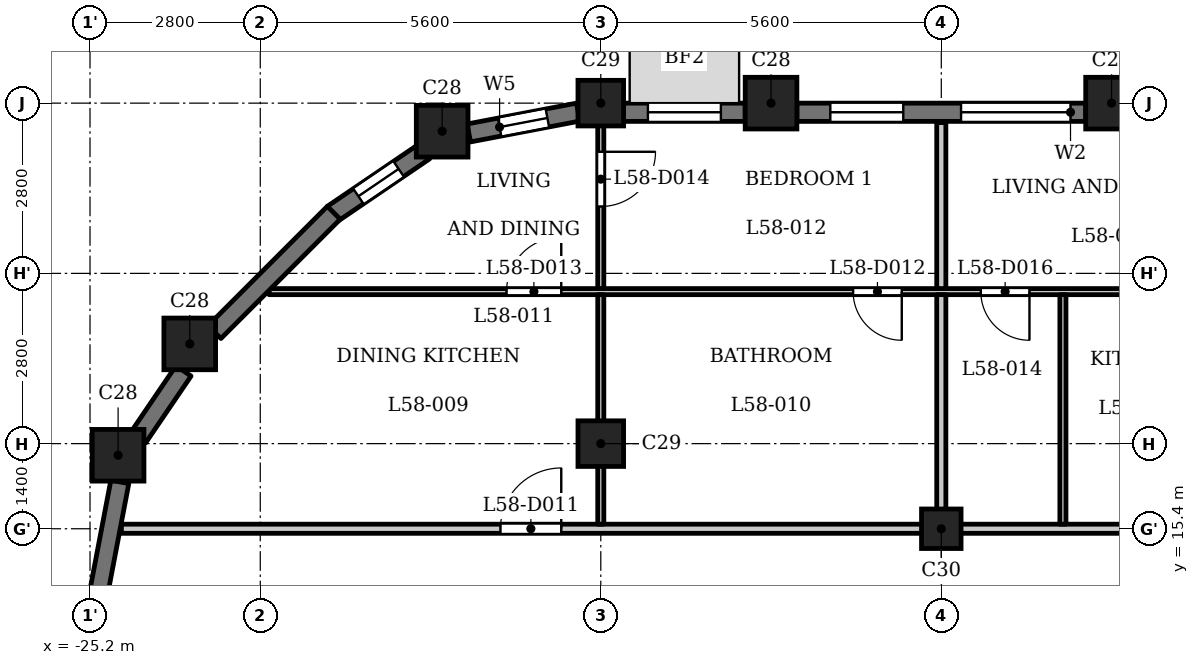
"""IFC4 building model, lengths in metres.
Left out: names, types, materials, properties, quantities, classifications, styles, units other than length and angle.
Written with IfcOpenShell. Run it as: python <this file> out.ifc"""

import sys

from ifc_helpers import new_model, si_unit, direction, frame, frame_2d, origin, origin_2d, place, context, subcontext, project, spatial, rectangle, extrude, element, fill, save


model = new_model("IFC4")
c1 = context("Model", 3, precision=1e-05, world=origin(), true_north=direction((0.0, 1.0)))
c2 = subcontext(c1, "Body", "Model", "MODEL_VIEW")
j1 = project(units=[si_unit("LENGTHUNIT", "METRE"), si_unit("PLANEANGLEUNIT", "RADIAN")], contexts=[c1])
p1 = place(None, origin())
s1 = spatial("IfcSite", under=j1, at=p1, CompositionType="ELEMENT")
p2 = place(p1, origin())
s2 = spatial("IfcBuilding", under=s1, at=p2, CompositionType="ELEMENT")
p3 = place(p2, frame((0.0, 0.0, 223.9)))
s3 = spatial("IfcBuildingStorey", under=s2, at=p3, CompositionType="ELEMENT", Elevation=223.9)
for number, where, z_axis, x_axis in (
    (1, (-8.4, 22.4, 0.0), (0.0, 0.0, 1.0), (1.0, 0.0, 0.0)),
    (2, (-14.0, 22.4, 0.0), (0.0, 0.0, 1.0), (1.0, 0.0, 0.0)),
    (3, (-19.409, 21.938, 0.0), (0.0, 0.0, 1.0), (1.0, 0.0, 0.0)),
    (4, (-23.56, 18.44, 0.0), (0.0, 0.0, 1.0), (1.0, 0.0, 0.0)),
    (5, (-24.738, 16.609, 0.0), (0.0, 0.0, 1.0), (1.0, 0.0, 0.0)),
):
    element("IfcColumn", number, at=place(p3, frame(where, z_axis=z_axis, x_axis=x_axis)), inside=s3, PredefinedType="COLUMN", context=c2, shape_type="SweptSolid", body=[
        extrude(rectangle(XDim=0.85, YDim=0.85, at=origin_2d()), origin(), (0.0, 0.0, 1.0), 3.5),
    ])
for number, where, z_axis, x_axis in (
    (6, (-16.8, 16.8, 0.0), (0.0, 0.0, 1.0), (1.0, 0.0, 0.0)),
    (7, (-16.8, 22.4, 0.0), (0.0, 0.0, 1.0), (1.0, 0.0, 0.0)),
):
    element("IfcColumn", number, at=place(p3, frame(where, z_axis=z_axis, x_axis=x_axis)), inside=s3, PredefinedType="COLUMN", context=c2, shape_type="SweptSolid", body=[
        extrude(rectangle(XDim=0.75, YDim=0.75, at=origin_2d()), origin(), (0.0, 0.0, 1.0), 3.5),
    ])
p4 = place(p3, frame((-11.2, 15.4, 0.0), z_axis=(0.0, 0.0, 1.0), x_axis=(1.0, 0.0, 0.0)))
e8 = element("IfcColumn", 8, at=p4, inside=s3, PredefinedType="COLUMN", context=c2, shape_type="SweptSolid", body=[
    extrude(rectangle(XDim=0.65, YDim=0.65, at=origin_2d()), origin(), (0.0, 0.0, 1.0), 3.5),
])
p5 = place(p3, frame((-8.825, 22.25, 0.0), z_axis=(0.0, 0.0, 1.0), x_axis=(-1.0, 0.0, 0.0)))
e9 = element("IfcWall", 9, at=p5, inside=s3, PredefinedType="SOLIDWALL", context=c2, shape_type="SweptSolid", body=[
    extrude(rectangle(XDim=4.75, YDim=0.3, at=frame_2d((2.375, 0.0))), origin(), (0.0, 0.0, 1.0), 2.5),
])
p6 = place(p5, frame((0.25, 0.0, 0.9)))
e10 = element("IfcOpeningElement", 10, at=p6, cuts=e9, PredefinedType="OPENING", context=c2, shape_type="SweptSolid", body=[
    extrude(rectangle(XDim=1.8, YDim=1.25, at=frame_2d((0.9, 0.625))), frame((0.0, 0.16, 0.0), z_axis=(0.0, -1.0, 0.0), x_axis=(1.0, 0.0, 0.0)), (0.0, 0.0, 1.0), 0.32),
])
p7 = place(p5, frame((3.0, 0.0, 0.6)))
e11 = element("IfcOpeningElement", 11, at=p7, cuts=e9, PredefinedType="OPENING", context=c2, shape_type="SweptSolid", body=[
    extrude(rectangle(XDim=1.2, YDim=1.55, at=frame_2d((0.6, 0.775))), frame((0.0, 0.16, 0.0), z_axis=(0.0, -1.0, 0.0), x_axis=(1.0, 0.0, 0.0)), (0.0, 0.0, 1.0), 0.32),
])
p8 = place(p3, frame((-14.425, 22.25, 0.0), z_axis=(0.0, 0.0, 1.0), x_axis=(-1.0, 0.0, 0.0)))
e12 = element("IfcWall", 12, at=p8, inside=s3, PredefinedType="SOLIDWALL", context=c2, shape_type="SweptSolid", body=[
    extrude(rectangle(XDim=2.0, YDim=0.3, at=frame_2d((1.0, 0.0))), origin(), (0.0, 0.0, 1.0), 2.5),
])
p9 = place(p8, frame((0.4, 0.0, 0.6)))
e13 = element("IfcOpeningElement", 13, at=p9, cuts=e12, PredefinedType="OPENING", context=c2, shape_type="SweptSolid", body=[
    extrude(rectangle(XDim=1.2, YDim=1.55, at=frame_2d((0.6, 0.775))), frame((0.0, 0.16, 0.0), z_axis=(0.0, -1.0, 0.0), x_axis=(1.0, 0.0, 0.0)), (0.0, 0.0, 1.0), 0.32),
])
p10 = place(p3, frame((-17.172, 22.253, 0.0), z_axis=(0.0, 0.0, 1.0), x_axis=(-0.982300037503, -0.187314271538, 0.0)))
e14 = element("IfcWall", 14, at=p10, inside=s3, PredefinedType="SOLIDWALL", context=c2, shape_type="SweptSolid", body=[
    extrude(rectangle(XDim=1.831, YDim=0.3, at=frame_2d((0.916, 0.0))), origin(), (0.0, 0.0, 1.0), 2.5),
])
p11 = place(p10, frame((0.516, 0.0, 0.6)))
e15 = element("IfcOpeningElement", 15, at=p11, cuts=e14, PredefinedType="OPENING", context=c2, shape_type="SweptSolid", body=[
    extrude(rectangle(XDim=0.8, YDim=1.55, at=frame_2d((0.4, 0.775))), frame((0.0, 0.16, 0.0), z_axis=(0.0, -1.0, 0.0), x_axis=(1.0, 0.0, 0.0)), (0.0, 0.0, 1.0), 0.32),
])
p12 = place(p3, frame((-19.698, 21.608, 0.0), z_axis=(0.0, 0.0, 1.0), x_axis=(-0.82705295608, -0.562124014644, 0.0)))
e16 = element("IfcWall", 16, at=p12, inside=s3, PredefinedType="SOLIDWALL", context=c2, shape_type="SweptSolid", body=[
    extrude(rectangle(XDim=1.831, YDim=0.3, at=frame_2d((0.916, 0.0))), origin(), (0.0, 0.0, 1.0), 2.5),
])
p13 = place(p12, frame((0.516, 0.0, 0.6)))
e17 = element("IfcOpeningElement", 17, at=p13, cuts=e16, PredefinedType="OPENING", context=c2, shape_type="SweptSolid", body=[
    extrude(rectangle(XDim=0.8, YDim=1.55, at=frame_2d((0.4, 0.775))), frame((0.0, 0.16, 0.0), z_axis=(0.0, -1.0, 0.0), x_axis=(1.0, 0.0, 0.0)), (0.0, 0.0, 1.0), 0.32),
])
p14 = place(p3, frame((-21.191, 20.597, 0.0), z_axis=(0.0, 0.0, 1.0), x_axis=(-0.707150767798, -0.707062791838, 0.0)))
e18 = element("IfcWall", 18, at=p14, inside=s3, PredefinedType="SOLIDWALL", context=c2, shape_type="SweptSolid", body=[
    extrude(rectangle(XDim=2.775, YDim=0.3, at=frame_2d((1.388, 0.0))), origin(), (0.0, 0.0, 1.0), 2.5),
])
p15 = place(p3, frame((-23.662, 17.996, 0.0), z_axis=(0.0, 0.0, 1.0), x_axis=(-0.562149004813, -0.827035970432, 0.0)))
e19 = element("IfcWall", 19, at=p15, inside=s3, PredefinedType="SOLIDWALL", context=c2, shape_type="SweptSolid", body=[
    extrude(rectangle(XDim=1.327, YDim=0.3, at=frame_2d((0.664, 0.0))), origin(), (0.0, 0.0, 1.0), 2.5),
])
p16 = place(p3, frame((-24.709, 16.171, 0.0), z_axis=(0.0, 0.0, 1.0), x_axis=(-0.187442908742, -0.982275499014, 0.0)))
e20 = element("IfcWall", 20, at=p16, inside=s3, PredefinedType="SOLIDWALL", context=c2, shape_type="SweptSolid", body=[
    extrude(rectangle(XDim=1.831, YDim=0.3, at=frame_2d((0.916, 0.0))), origin(), (0.0, 0.0, 1.0), 2.5),
])
p17 = place(p3, frame((-24.684, 15.4, 0.0), z_axis=(0.0, 0.0, 1.0), x_axis=(1.0, 0.0, 0.0)))
e21 = element("IfcWall", 21, at=p17, inside=s3, PredefinedType="PARTITIONING", context=c2, shape_type="SweptSolid", body=[
    extrude(rectangle(XDim=49.368, YDim=0.15, at=frame_2d((24.684, 0.0))), origin(), (0.0, 0.0, 1.0), 3.2),
])
p18 = place(p17, frame((6.234, 0.0, 0.0)))
e22 = element("IfcOpeningElement", 22, at=p18, cuts=e21, PredefinedType="OPENING", context=c2, shape_type="SweptSolid", body=[
    extrude(rectangle(XDim=1.0, YDim=2.1, at=frame_2d((0.5, 1.05))), frame((0.0, 0.085, 0.0), z_axis=(0.0, -1.0, 0.0), x_axis=(1.0, 0.0, 0.0)), (0.0, 0.0, 1.0), 0.17),
])
p19 = place(p17, frame((17.434, 0.0, 0.0)))
e23 = element("IfcOpeningElement", 23, at=p19, cuts=e21, PredefinedType="OPENING", context=c2, shape_type="SweptSolid", body=[
    extrude(rectangle(XDim=1.0, YDim=2.1, at=frame_2d((0.5, 1.05))), frame((0.0, 0.085, 0.0), z_axis=(0.0, -1.0, 0.0), x_axis=(1.0, 0.0, 0.0)), (0.0, 0.0, 1.0), 0.17),
])
p20 = place(p17, frame((25.384, 0.0, 0.0)))
e24 = element("IfcOpeningElement", 24, at=p20, cuts=e21, PredefinedType="OPENING", context=c2, shape_type="SweptSolid", body=[
    extrude(rectangle(XDim=1.0, YDim=2.1, at=frame_2d((0.5, 1.05))), frame((0.0, 0.085, 0.0), z_axis=(0.0, -1.0, 0.0), x_axis=(1.0, 0.0, 0.0)), (0.0, 0.0, 1.0), 0.17),
])
p21 = place(p17, frame((33.484, 0.0, 0.0)))
e25 = element("IfcOpeningElement", 25, at=p21, cuts=e21, PredefinedType="OPENING", context=c2, shape_type="SweptSolid", body=[
    extrude(rectangle(XDim=1.0, YDim=2.1, at=frame_2d((0.5, 1.05))), frame((0.0, 0.085, 0.0), z_axis=(0.0, -1.0, 0.0), x_axis=(1.0, 0.0, 0.0)), (0.0, 0.0, 1.0), 0.17),
])
p22 = place(p17, frame((47.225, 0.0, 0.0)))
e26 = element("IfcOpeningElement", 26, at=p22, cuts=e21, PredefinedType="OPENING", context=c2, shape_type="SweptSolid", body=[
    extrude(rectangle(XDim=1.0, YDim=2.1, at=frame_2d((0.5, 1.05))), frame((0.0, 0.085, 0.0), z_axis=(0.0, -1.0, 0.0), x_axis=(1.0, 0.0, 0.0)), (0.0, 0.0, 1.0), 0.17),
])
p23 = place(p3, frame((-22.256, 19.3, 0.0), z_axis=(0.0, 0.0, 1.0), x_axis=(1.0, 0.0, 0.0)))
e27 = element("IfcWall", 27, at=p23, inside=s3, PredefinedType="PARTITIONING", context=c2, shape_type="SweptSolid", body=[
    extrude(rectangle(XDim=44.511, YDim=0.1, at=frame_2d((22.256, 0.0))), origin(), (0.0, 0.0, 1.0), 3.2),
])
p24 = place(p23, frame((9.606, 0.0, 0.0)))
e28 = element("IfcOpeningElement", 28, at=p24, cuts=e27, PredefinedType="OPENING", context=c2, shape_type="SweptSolid", body=[
    extrude(rectangle(XDim=0.8, YDim=2.1, at=frame_2d((0.4, 1.05))), frame((0.0, 0.06, 0.0), z_axis=(0.0, -1.0, 0.0), x_axis=(1.0, 0.0, 0.0)), (0.0, 0.0, 1.0), 0.12),
])
p25 = place(p23, frame((3.906, 0.0, 0.0)))
e29 = element("IfcOpeningElement", 29, at=p25, cuts=e27, PredefinedType="OPENING", context=c2, shape_type="SweptSolid", body=[
    extrude(rectangle(XDim=0.9, YDim=2.1, at=frame_2d((0.45, 1.05))), frame((0.0, 0.06, 0.0), z_axis=(0.0, -1.0, 0.0), x_axis=(1.0, 0.0, 0.0)), (0.0, 0.0, 1.0), 0.12),
])
p26 = place(p23, frame((11.706, 0.0, 0.0)))
e30 = element("IfcOpeningElement", 30, at=p26, cuts=e27, PredefinedType="OPENING", context=c2, shape_type="SweptSolid", body=[
    extrude(rectangle(XDim=0.8, YDim=2.1, at=frame_2d((0.4, 1.05))), frame((0.0, 0.06, 0.0), z_axis=(0.0, -1.0, 0.0), x_axis=(1.0, 0.0, 0.0)), (0.0, 0.0, 1.0), 0.12),
])
p27 = place(p23, frame((15.106, 0.0, 0.0)))
e31 = element("IfcOpeningElement", 31, at=p27, cuts=e27, PredefinedType="OPENING", context=c2, shape_type="SweptSolid", body=[
    extrude(rectangle(XDim=0.9, YDim=2.1, at=frame_2d((0.45, 1.05))), frame((0.0, 0.06, 0.0), z_axis=(0.0, -1.0, 0.0), x_axis=(1.0, 0.0, 0.0)), (0.0, 0.0, 1.0), 0.12),
])
p28 = place(p23, frame((17.556, 0.0, 0.0)))
e32 = element("IfcOpeningElement", 32, at=p28, cuts=e27, PredefinedType="OPENING", context=c2, shape_type="SweptSolid", body=[
    extrude(rectangle(XDim=0.8, YDim=2.1, at=frame_2d((0.4, 1.05))), frame((0.0, 0.06, 0.0), z_axis=(0.0, -1.0, 0.0), x_axis=(1.0, 0.0, 0.0)), (0.0, 0.0, 1.0), 0.12),
])
p29 = place(p23, frame((19.956, 0.0, 0.0)))
e33 = element("IfcOpeningElement", 33, at=p29, cuts=e27, PredefinedType="OPENING", context=c2, shape_type="SweptSolid", body=[
    extrude(rectangle(XDim=0.9, YDim=2.1, at=frame_2d((0.45, 1.05))), frame((0.0, 0.06, 0.0), z_axis=(0.0, -1.0, 0.0), x_axis=(1.0, 0.0, 0.0)), (0.0, 0.0, 1.0), 0.12),
])
p30 = place(p23, frame((23.456, 0.0, 0.0)))
e34 = element("IfcOpeningElement", 34, at=p30, cuts=e27, PredefinedType="OPENING", context=c2, shape_type="SweptSolid", body=[
    extrude(rectangle(XDim=0.9, YDim=2.1, at=frame_2d((0.45, 1.05))), frame((0.0, 0.06, 0.0), z_axis=(0.0, -1.0, 0.0), x_axis=(1.0, 0.0, 0.0)), (0.0, 0.0, 1.0), 0.12),
])
p31 = place(p23, frame((26.056, 0.0, 0.0)))
e35 = element("IfcOpeningElement", 35, at=p31, cuts=e27, PredefinedType="OPENING", context=c2, shape_type="SweptSolid", body=[
    extrude(rectangle(XDim=0.9, YDim=2.1, at=frame_2d((0.45, 1.05))), frame((0.0, 0.06, 0.0), z_axis=(0.0, -1.0, 0.0), x_axis=(1.0, 0.0, 0.0)), (0.0, 0.0, 1.0), 0.12),
])
p32 = place(p23, frame((28.756, 0.0, 0.0)))
e36 = element("IfcOpeningElement", 36, at=p32, cuts=e27, PredefinedType="OPENING", context=c2, shape_type="SweptSolid", body=[
    extrude(rectangle(XDim=0.8, YDim=2.1, at=frame_2d((0.4, 1.05))), frame((0.0, 0.06, 0.0), z_axis=(0.0, -1.0, 0.0), x_axis=(1.0, 0.0, 0.0)), (0.0, 0.0, 1.0), 0.12),
])
p33 = place(p23, frame((31.156, 0.0, 0.0)))
e37 = element("IfcOpeningElement", 37, at=p33, cuts=e27, PredefinedType="OPENING", context=c2, shape_type="SweptSolid", body=[
    extrude(rectangle(XDim=0.9, YDim=2.1, at=frame_2d((0.45, 1.05))), frame((0.0, 0.06, 0.0), z_axis=(0.0, -1.0, 0.0), x_axis=(1.0, 0.0, 0.0)), (0.0, 0.0, 1.0), 0.12),
])
p34 = place(p23, frame((37.606, 0.0, 0.0)))
e38 = element("IfcOpeningElement", 38, at=p34, cuts=e27, PredefinedType="OPENING", context=c2, shape_type="SweptSolid", body=[
    extrude(rectangle(XDim=0.8, YDim=2.1, at=frame_2d((0.4, 1.05))), frame((0.0, 0.06, 0.0), z_axis=(0.0, -1.0, 0.0), x_axis=(1.0, 0.0, 0.0)), (0.0, 0.0, 1.0), 0.12),
])
p35 = place(p23, frame((42.028, 0.0, 0.0)))
e39 = element("IfcOpeningElement", 39, at=p35, cuts=e27, PredefinedType="OPENING", context=c2, shape_type="SweptSolid", body=[
    extrude(rectangle(XDim=0.9, YDim=2.1, at=frame_2d((0.45, 1.05))), frame((0.0, 0.06, 0.0), z_axis=(0.0, -1.0, 0.0), x_axis=(1.0, 0.0, 0.0)), (0.0, 0.0, 1.0), 0.12),
])
p36 = place(p3, frame((-16.8, 15.475, 0.0), z_axis=(0.0, 0.0, 1.0), x_axis=(0.0, 1.0, 0.0)))
e40 = element("IfcWall", 40, at=p36, inside=s3, PredefinedType="PARTITIONING", context=c2, shape_type="SweptSolid", body=[
    extrude(rectangle(XDim=3.775, YDim=0.1, at=frame_2d((1.887, 0.0))), origin(), (0.0, 0.0, 1.0), 2.55),
])
p37 = place(p3, frame((-16.8, 19.35, 0.0), z_axis=(0.0, 0.0, 1.0), x_axis=(0.0, 1.0, 0.0)))
e41 = element("IfcWall", 41, at=p37, inside=s3, PredefinedType="PARTITIONING", context=c2, shape_type="SweptSolid", body=[
    extrude(rectangle(XDim=2.96, YDim=0.1, at=frame_2d((1.48, 0.0))), origin(), (0.0, 0.0, 1.0), 2.55),
])
p38 = place(p37, frame((1.35, 0.0, 0.0)))
e42 = element("IfcOpeningElement", 42, at=p38, cuts=e41, PredefinedType="OPENING", context=c2, shape_type="SweptSolid", body=[
    extrude(rectangle(XDim=0.9, YDim=2.1, at=frame_2d((0.45, 1.05))), frame((0.0, 0.06, 0.0), z_axis=(0.0, -1.0, 0.0), x_axis=(1.0, 0.0, 0.0)), (0.0, 0.0, 1.0), 0.12),
])
p39 = place(p3, frame((-11.2, 15.475, 0.0), z_axis=(0.0, 0.0, 1.0), x_axis=(0.0, 1.0, 0.0)))
e43 = element("IfcWall", 43, at=p39, inside=s3, PredefinedType="PARTITIONING", context=c2, shape_type="SweptSolid", body=[
    extrude(rectangle(XDim=3.775, YDim=0.15, at=frame_2d((1.887, 0.0))), origin(), (0.0, 0.0, 1.0), 3.2),
])
p40 = place(p3, frame((-11.2, 19.35, 0.0), z_axis=(0.0, 0.0, 1.0), x_axis=(0.0, 1.0, 0.0)))
e44 = element("IfcWall", 44, at=p40, inside=s3, PredefinedType="PARTITIONING", context=c2, shape_type="SweptSolid", body=[
    extrude(rectangle(XDim=2.73, YDim=0.15, at=frame_2d((1.365, 0.0))), origin(), (0.0, 0.0, 1.0), 3.2),
])
p41 = place(p3, frame((-9.2, 15.475, 0.0), z_axis=(0.0, 0.0, 1.0), x_axis=(0.0, 1.0, 0.0)))
e45 = element("IfcWall", 45, at=p41, inside=s3, PredefinedType="PARTITIONING", context=c2, shape_type="SweptSolid", body=[
    extrude(rectangle(XDim=3.775, YDim=0.1, at=frame_2d((1.887, 0.0))), origin(), (0.0, 0.0, 1.0), 3.2),
])
p42 = place(p18, origin())
e46 = element("IfcDoor", 46, at=p42, inside=s3, OperationType="SINGLE_SWING_LEFT", PredefinedType="DOOR", context=c2, shape_type="SweptSolid", body=[
    extrude(rectangle(XDim=1.0, YDim=2.1, at=frame_2d((0.5, 1.05))), frame((0.0, 0.025, 0.0), z_axis=(0.0, -1.0, 0.0), x_axis=(1.0, 0.0, 0.0)), (0.0, 0.0, 1.0), 0.05),
])
fill(e22, e46)
p43 = place(p24, origin())
e47 = element("IfcDoor", 47, at=p43, inside=s3, OperationType="SINGLE_SWING_RIGHT", PredefinedType="DOOR", context=c2, shape_type="SweptSolid", body=[
    extrude(rectangle(XDim=0.8, YDim=2.1, at=frame_2d((0.4, 1.05))), frame((0.0, 0.025, 0.0), z_axis=(0.0, -1.0, 0.0), x_axis=(1.0, 0.0, 0.0)), (0.0, 0.0, 1.0), 0.05),
])
fill(e28, e47)
p44 = place(p25, origin())
e48 = element("IfcDoor", 48, at=p44, inside=s3, OperationType="SINGLE_SWING_LEFT", PredefinedType="DOOR", context=c2, shape_type="SweptSolid", body=[
    extrude(rectangle(XDim=0.9, YDim=2.1, at=frame_2d((0.45, 1.05))), frame((0.0, 0.025, 0.0), z_axis=(0.0, -1.0, 0.0), x_axis=(1.0, 0.0, 0.0)), (0.0, 0.0, 1.0), 0.05),
])
fill(e29, e48)
p45 = place(p38, origin())
e49 = element("IfcDoor", 49, at=p45, inside=s3, OperationType="SINGLE_SWING_RIGHT", PredefinedType="DOOR", context=c2, shape_type="SweptSolid", body=[
    extrude(rectangle(XDim=0.9, YDim=2.1, at=frame_2d((0.45, 1.05))), frame((0.0, 0.025, 0.0), z_axis=(0.0, -1.0, 0.0), x_axis=(1.0, 0.0, 0.0)), (0.0, 0.0, 1.0), 0.05),
])
fill(e42, e49)
p46 = place(p26, origin())
e50 = element("IfcDoor", 50, at=p46, inside=s3, OperationType="SINGLE_SWING_RIGHT", PredefinedType="DOOR", context=c2, shape_type="SweptSolid", body=[
    extrude(rectangle(XDim=0.8, YDim=2.1, at=frame_2d((0.4, 1.05))), frame((0.0, 0.025, 0.0), z_axis=(0.0, -1.0, 0.0), x_axis=(1.0, 0.0, 0.0)), (0.0, 0.0, 1.0), 0.05),
])
fill(e30, e50)
p47 = place(p6, origin())
e51 = element("IfcWindow", 51, at=p47, inside=s3, PartitioningType="SINGLE_PANEL", PredefinedType="WINDOW", context=c2, shape_type="SweptSolid", body=[
    extrude(rectangle(XDim=1.8, YDim=1.25, at=frame_2d((0.9, 0.625))), frame((0.0, 0.03, 0.0), z_axis=(0.0, -1.0, 0.0), x_axis=(1.0, 0.0, 0.0)), (0.0, 0.0, 1.0), 0.06),
])
fill(e10, e51)
p48 = place(p7, origin())
e52 = element("IfcWindow", 52, at=p48, inside=s3, PartitioningType="SINGLE_PANEL", PredefinedType="WINDOW", context=c2, shape_type="SweptSolid", body=[
    extrude(rectangle(XDim=1.2, YDim=1.55, at=frame_2d((0.6, 0.775))), frame((0.0, 0.03, 0.0), z_axis=(0.0, -1.0, 0.0), x_axis=(1.0, 0.0, 0.0)), (0.0, 0.0, 1.0), 0.06),
])
fill(e11, e52)
p49 = place(p9, origin())
e53 = element("IfcWindow", 53, at=p49, inside=s3, PartitioningType="SINGLE_PANEL", PredefinedType="WINDOW", context=c2, shape_type="SweptSolid", body=[
    extrude(rectangle(XDim=1.2, YDim=1.55, at=frame_2d((0.6, 0.775))), frame((0.0, 0.03, 0.0), z_axis=(0.0, -1.0, 0.0), x_axis=(1.0, 0.0, 0.0)), (0.0, 0.0, 1.0), 0.06),
])
fill(e13, e53)
p50 = place(p11, origin())
e54 = element("IfcWindow", 54, at=p50, inside=s3, PartitioningType="SINGLE_PANEL", PredefinedType="WINDOW", context=c2, shape_type="SweptSolid", body=[
    extrude(rectangle(XDim=0.8, YDim=1.55, at=frame_2d((0.4, 0.775))), frame((0.0, 0.03, 0.0), z_axis=(0.0, -1.0, 0.0), x_axis=(1.0, 0.0, 0.0)), (0.0, 0.0, 1.0), 0.06),
])
fill(e15, e54)
p51 = place(p13, origin())
e55 = element("IfcWindow", 55, at=p51, inside=s3, PartitioningType="SINGLE_PANEL", PredefinedType="WINDOW", context=c2, shape_type="SweptSolid", body=[
    extrude(rectangle(XDim=0.8, YDim=1.55, at=frame_2d((0.4, 0.775))), frame((0.0, 0.03, 0.0), z_axis=(0.0, -1.0, 0.0), x_axis=(1.0, 0.0, 0.0)), (0.0, 0.0, 1.0), 0.06),
])
fill(e17, e55)
save(model, sys.argv[1])
